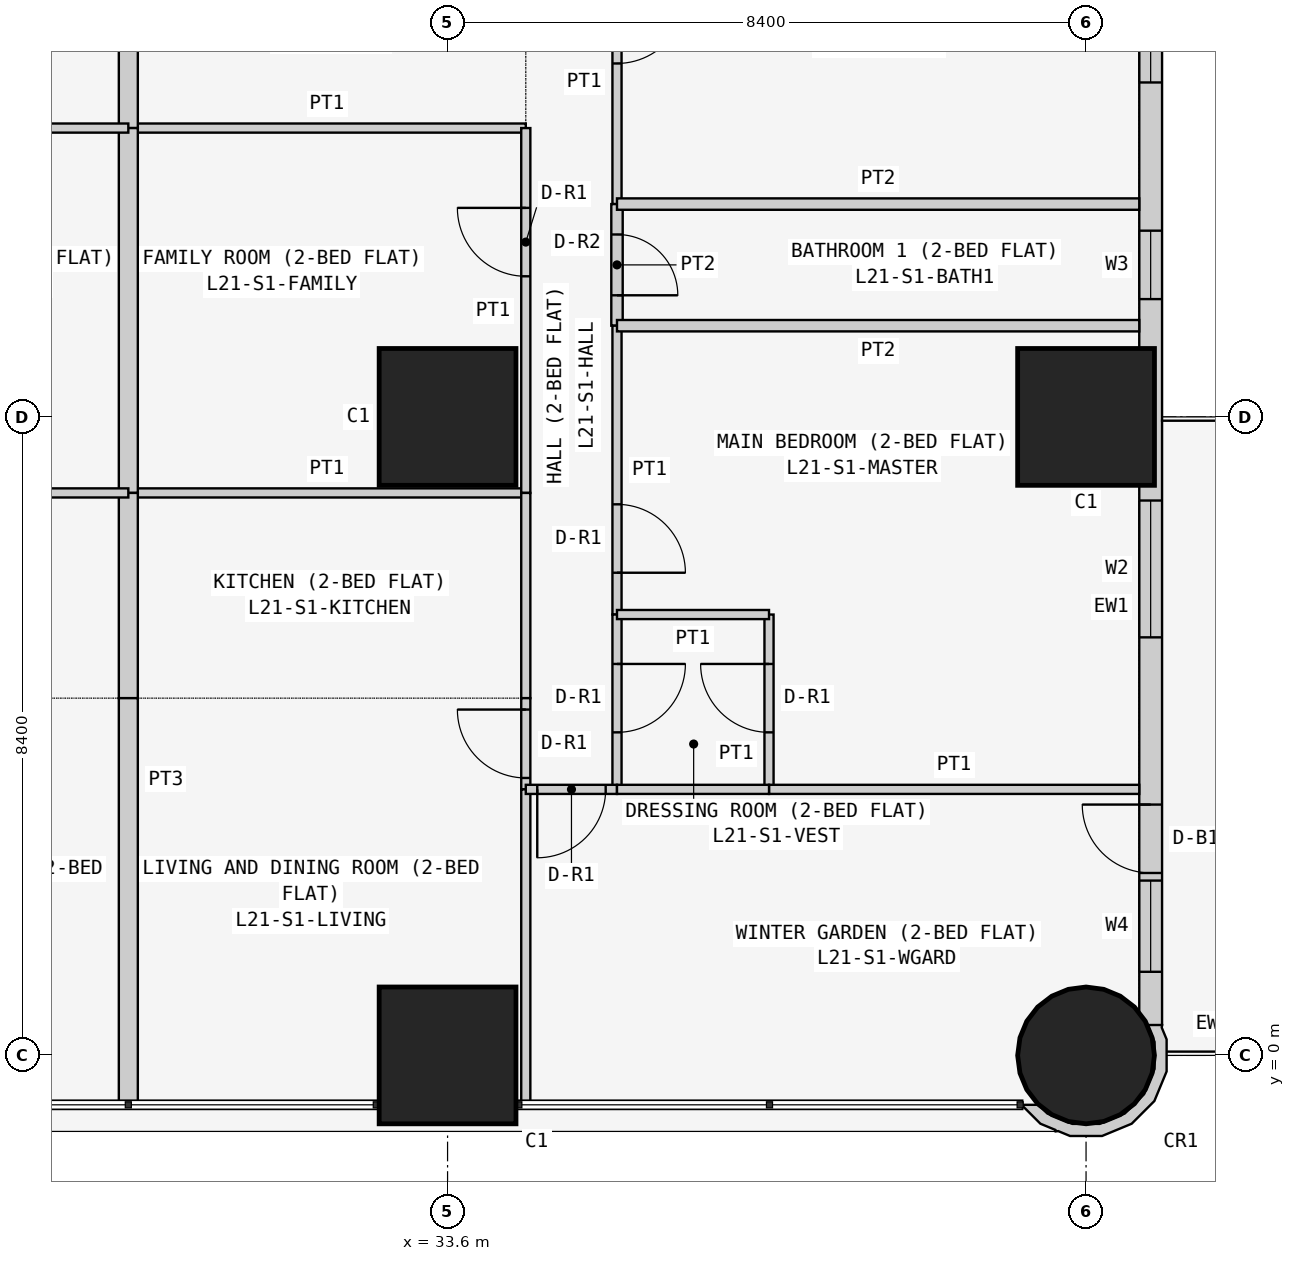
"""IFC4 building model, lengths in metres.
Left out: names, types, materials, properties, quantities, classifications, styles, units other than length and angle.
Written with IfcOpenShell. Run it as: python <this file> out.ifc"""

import sys

from ifc_helpers import new_model, si_unit, direction, frame, frame_2d, origin, origin_2d, place, context, subcontext, project, spatial, polyline, rectangle, circle, outline, extrude, element, fill, save


model = new_model("IFC4")
c1 = context("Model", 3, precision=1e-05, world=origin(), true_north=direction((0.0, 1.0)))
c2 = subcontext(c1, "Body", "Model", "MODEL_VIEW")
j1 = project(units=[si_unit("LENGTHUNIT", "METRE"), si_unit("PLANEANGLEUNIT", "RADIAN")], contexts=[c1])
p1 = place(None, origin())
s1 = spatial("IfcSite", under=j1, at=p1, CompositionType="ELEMENT")
p2 = place(p1, origin())
s2 = spatial("IfcBuilding", under=s1, at=p2, CompositionType="ELEMENT")
p3 = place(p2, frame((0.0, 0.0, 84.9)))
s3 = spatial("IfcBuildingStorey", under=s2, at=p3, CompositionType="ELEMENT", Elevation=84.9)
for number, where, z_axis, x_axis in (
    (1, (33.6, 0.0, 0.0), (0.0, 0.0, 1.0), (1.0, 0.0, 0.0)),
    (2, (33.6, 8.4, 0.0), (0.0, 0.0, 1.0), (1.0, 0.0, 0.0)),
):
    element("IfcColumn", number, at=place(p3, frame(where, z_axis=z_axis, x_axis=x_axis)), inside=s3, PredefinedType="COLUMN", context=c2, shape_type="SweptSolid", body=[
        extrude(rectangle(XDim=1.8, YDim=1.8, at=origin_2d()), origin(), (0.0, 0.0, 1.0), 3.6),
    ])
p4 = place(p3, frame((42.0, 0.0, 0.0), z_axis=(0.0, 0.0, 1.0), x_axis=(1.0, 0.0, 0.0)))
e3 = element("IfcColumn", 3, at=p4, inside=s3, PredefinedType="COLUMN", context=c2, shape_type="SweptSolid", body=[
    extrude(circle(Radius=0.9, at=origin_2d()), origin(), (0.0, 0.0, 1.0), 3.6),
])
p5 = place(p3, frame((42.0, 8.4, 0.0), z_axis=(0.0, 0.0, 1.0), x_axis=(1.0, 0.0, 0.0)))
e4 = element("IfcColumn", 4, at=p5, inside=s3, PredefinedType="COLUMN", context=c2, shape_type="SweptSolid", body=[
    extrude(rectangle(XDim=1.8, YDim=1.8, at=origin_2d()), origin(), (0.0, 0.0, 1.0), 3.6),
])
p6 = place(p3, frame((42.85, 0.4, 0.0), z_axis=(0.0, 0.0, 1.0), x_axis=(0.0, 1.0, 0.0)))
e5 = element("IfcWall", 5, at=p6, inside=s3, PredefinedType="SOLIDWALL", context=c2, shape_type="SweptSolid", body=[
    extrude(rectangle(XDim=15.7, YDim=0.3, at=frame_2d((7.85, 0.0))), origin(), (0.0, 0.0, 1.0), 3.45),
])
p7 = place(p6, frame((12.4, 0.0, 0.9)))
e6 = element("IfcOpeningElement", 6, at=p7, cuts=e5, PredefinedType="OPENING", context=c2, shape_type="SweptSolid", body=[
    extrude(rectangle(XDim=1.8, YDim=1.5, at=frame_2d((0.9, 0.75))), frame((0.0, 0.16, 0.0), z_axis=(0.0, -1.0, 0.0), x_axis=(1.0, 0.0, 0.0)), (0.0, 0.0, 1.0), 0.32),
])
p8 = place(p6, frame((9.55, 0.0, 1.5)))
e7 = element("IfcOpeningElement", 7, at=p8, cuts=e5, PredefinedType="OPENING", context=c2, shape_type="SweptSolid", body=[
    extrude(rectangle(XDim=0.9, YDim=0.7, at=frame_2d((0.45, 0.35))), frame((0.0, 0.16, 0.0), z_axis=(0.0, -1.0, 0.0), x_axis=(1.0, 0.0, 0.0)), (0.0, 0.0, 1.0), 0.32),
])
p9 = place(p6, frame((5.1, 0.0, 0.9)))
e8 = element("IfcOpeningElement", 8, at=p9, cuts=e5, PredefinedType="OPENING", context=c2, shape_type="SweptSolid", body=[
    extrude(rectangle(XDim=1.8, YDim=1.5, at=frame_2d((0.9, 0.75))), frame((0.0, 0.16, 0.0), z_axis=(0.0, -1.0, 0.0), x_axis=(1.0, 0.0, 0.0)), (0.0, 0.0, 1.0), 0.32),
])
p10 = place(p6, frame((2.0, 0.0, 0.0)))
e9 = element("IfcOpeningElement", 9, at=p10, cuts=e5, PredefinedType="OPENING", context=c2, shape_type="SweptSolid", body=[
    extrude(rectangle(XDim=0.9, YDim=2.4, at=frame_2d((0.45, 1.2))), frame((0.0, 0.16, 0.0), z_axis=(0.0, -1.0, 0.0), x_axis=(1.0, 0.0, 0.0)), (0.0, 0.0, 1.0), 0.32),
])
p11 = place(p6, frame((0.7, 0.0, 0.9)))
e10 = element("IfcOpeningElement", 10, at=p11, cuts=e5, PredefinedType="OPENING", context=c2, shape_type="SweptSolid", body=[
    extrude(rectangle(XDim=1.2, YDim=1.5, at=frame_2d((0.6, 0.75))), frame((0.0, 0.16, 0.0), z_axis=(0.0, -1.0, 0.0), x_axis=(1.0, 0.0, 0.0)), (0.0, 0.0, 1.0), 0.32),
])
p12 = place(p3, frame((41.233, -0.611, 0.0), z_axis=(0.0, 0.0, 1.0), x_axis=(0.377204953059, -0.926129809145, 0.0)))
e11 = element("IfcWall", 11, at=p12, inside=s3, PredefinedType="SOLIDWALL", context=c2, shape_type="SweptSolid", body=[
    extrude(outline(polyline([(0.319, 1.843), (-0.072, 2.001), (-0.24, 2.001), (-0.269, 2.017), (-0.37, 1.841), (-0.102, 1.842), (0.23, 1.707), (0.485, 1.455), (0.624, 1.125), (0.626, 0.766), (0.49, 0.434), (0.239, 0.179), (0.09, 0.117), (0.011, -0.078), (0.024, -0.083), (0.33, 0.045), (0.48, 0.197), (0.499, 0.193), (0.508, 0.225), (0.626, 0.345), (0.785, 0.736), (0.782, 1.157), (0.619, 1.546), (0.319, 1.843)])), origin(), (0.0, 0.0, 1.0), 3.45),
])
p13 = place(p3, frame((29.4, 12.2, 0.0), z_axis=(0.0, 0.0, 1.0), x_axis=(1.0, 0.0, 0.0)))
e12 = element("IfcWall", 12, at=p13, inside=s3, PredefinedType="PARTITIONING", context=c2, shape_type="SweptSolid", body=[
    extrude(rectangle(XDim=5.229, YDim=0.12, at=frame_2d((2.615, 0.0))), origin(), (0.0, 0.0, 1.0), 3.45),
])
p14 = place(p3, frame((29.4, 15.775, 0.0), z_axis=(0.0, 0.0, 1.0), x_axis=(0.0, -1.0, 0.0)))
e13 = element("IfcWall", 13, at=p14, inside=s3, PredefinedType="PARTITIONING", context=c2, shape_type="SweptSolid", body=[
    extrude(rectangle(XDim=3.575, YDim=0.25, at=frame_2d((1.788, 0.0))), origin(), (0.0, 0.0, 1.0), 2.848),
])
p15 = place(p3, frame((29.4, 7.4, 0.0), z_axis=(0.0, 0.0, 1.0), x_axis=(1.0, 0.0, 0.0)))
e14 = element("IfcWall", 14, at=p15, inside=s3, PredefinedType="PARTITIONING", context=c2, shape_type="SweptSolid", body=[
    extrude(rectangle(XDim=5.229, YDim=0.12, at=frame_2d((2.615, 0.0))), origin(), (0.0, 0.0, 1.0), 3.45),
])
p16 = place(p3, frame((34.629, 7.4, 0.0), z_axis=(0.0, 0.0, 1.0), x_axis=(0.0, 1.0, 0.0)))
e15 = element("IfcWall", 15, at=p16, inside=s3, PredefinedType="PARTITIONING", context=c2, shape_type="SweptSolid", body=[
    extrude(rectangle(XDim=4.8, YDim=0.12, at=frame_2d((2.4, 0.0))), origin(), (0.0, 0.0, 1.0), 3.45),
])
p17 = place(p16, frame((2.85, 0.0, 0.0)))
e16 = element("IfcOpeningElement", 16, at=p17, cuts=e15, PredefinedType="OPENING", context=c2, shape_type="SweptSolid", body=[
    extrude(rectangle(XDim=0.9, YDim=2.1, at=frame_2d((0.45, 1.05))), frame((0.0, 0.07, 0.0), z_axis=(0.0, -1.0, 0.0), x_axis=(1.0, 0.0, 0.0)), (0.0, 0.0, 1.0), 0.14),
])
p18 = place(p3, frame((29.4, 12.2, 0.0), z_axis=(0.0, 0.0, 1.0), x_axis=(0.0, -1.0, 0.0)))
e17 = element("IfcWall", 17, at=p18, inside=s3, PredefinedType="PARTITIONING", context=c2, shape_type="SweptSolid", body=[
    extrude(rectangle(XDim=4.8, YDim=0.25, at=frame_2d((2.4, 0.0))), origin(), (0.0, 0.0, 1.0), 2.848),
])
p19 = place(p3, frame((34.629, 4.7, 0.0), z_axis=(0.0, 0.0, 1.0), x_axis=(0.0, 1.0, 0.0)))
e18 = element("IfcWall", 18, at=p19, inside=s3, PredefinedType="PARTITIONING", context=c2, shape_type="SweptSolid", body=[
    extrude(rectangle(XDim=2.7, YDim=0.12, at=frame_2d((1.35, 0.0))), origin(), (0.0, 0.0, 1.0), 3.45),
])
p20 = place(p3, frame((29.4, 7.4, 0.0), z_axis=(0.0, 0.0, 1.0), x_axis=(0.0, -1.0, 0.0)))
e19 = element("IfcWall", 19, at=p20, inside=s3, PredefinedType="PARTITIONING", context=c2, shape_type="SweptSolid", body=[
    extrude(rectangle(XDim=2.7, YDim=0.25, at=frame_2d((1.35, 0.0))), origin(), (0.0, 0.0, 1.0), 2.848),
])
p21 = place(p3, frame((34.629, 3.5, 0.0), z_axis=(0.0, 0.0, 1.0), x_axis=(0.0, 1.0, 0.0)))
e20 = element("IfcWall", 20, at=p21, inside=s3, PredefinedType="PARTITIONING", context=c2, shape_type="SweptSolid", body=[
    extrude(rectangle(XDim=1.2, YDim=0.12, at=frame_2d((0.6, 0.0))), origin(), (0.0, 0.0, 1.0), 3.45),
])
p22 = place(p21, frame((0.15, 0.0, 0.0)))
e21 = element("IfcOpeningElement", 21, at=p22, cuts=e20, PredefinedType="OPENING", context=c2, shape_type="SweptSolid", body=[
    extrude(rectangle(XDim=0.9, YDim=2.1, at=frame_2d((0.45, 1.05))), frame((0.0, 0.07, 0.0), z_axis=(0.0, -1.0, 0.0), x_axis=(1.0, 0.0, 0.0)), (0.0, 0.0, 1.0), 0.14),
])
p23 = place(p3, frame((34.629, -0.65, 0.0), z_axis=(0.0, 0.0, 1.0), x_axis=(0.0, 1.0, 0.0)))
e22 = element("IfcWall", 22, at=p23, inside=s3, PredefinedType="PARTITIONING", context=c2, shape_type="SweptSolid", body=[
    extrude(rectangle(XDim=4.15, YDim=0.12, at=frame_2d((2.075, 0.0))), origin(), (0.0, 0.0, 1.0), 3.45),
])
p24 = place(p3, frame((29.4, 4.7, 0.0), z_axis=(0.0, 0.0, 1.0), x_axis=(0.0, -1.0, 0.0)))
e23 = element("IfcWall", 23, at=p24, inside=s3, PredefinedType="PARTITIONING", context=c2, shape_type="SweptSolid", body=[
    extrude(rectangle(XDim=5.35, YDim=0.25, at=frame_2d((2.675, 0.0))), origin(), (0.0, 0.0, 1.0), 2.848),
])
p25 = place(p3, frame((35.829, 11.2, 0.0), z_axis=(0.0, 0.0, 1.0), x_axis=(0.0, 1.0, 0.0)))
e24 = element("IfcWall", 24, at=p25, inside=s3, PredefinedType="PARTITIONING", context=c2, shape_type="SweptSolid", body=[
    extrude(rectangle(XDim=4.575, YDim=0.12, at=frame_2d((2.288, 0.0))), origin(), (0.0, 0.0, 1.0), 3.45),
])
p26 = place(p25, frame((1.85, 0.0, 0.0)))
e25 = element("IfcOpeningElement", 25, at=p26, cuts=e24, PredefinedType="OPENING", context=c2, shape_type="SweptSolid", body=[
    extrude(rectangle(XDim=0.9, YDim=2.1, at=frame_2d((0.45, 1.05))), frame((0.0, 0.07, 0.0), z_axis=(0.0, -1.0, 0.0), x_axis=(1.0, 0.0, 0.0)), (0.0, 0.0, 1.0), 0.14),
])
p27 = place(p3, frame((35.829, 9.6, 0.0), z_axis=(0.0, 0.0, 1.0), x_axis=(0.0, 1.0, 0.0)))
e26 = element("IfcWall", 26, at=p27, inside=s3, PredefinedType="PARTITIONING", context=c2, shape_type="SweptSolid", body=[
    extrude(rectangle(XDim=1.6, YDim=0.15, at=frame_2d((0.8, 0.0))), origin(), (0.0, 0.0, 1.0), 3.45),
])
p28 = place(p27, frame((0.4, 0.0, 0.0)))
e27 = element("IfcOpeningElement", 27, at=p28, cuts=e26, PredefinedType="OPENING", context=c2, shape_type="SweptSolid", body=[
    extrude(rectangle(XDim=0.8, YDim=2.1, at=frame_2d((0.4, 1.05))), frame((0.0, 0.085, 0.0), z_axis=(0.0, -1.0, 0.0), x_axis=(1.0, 0.0, 0.0)), (0.0, 0.0, 1.0), 0.17),
])
p29 = place(p3, frame((35.829, 5.8, 0.0), z_axis=(0.0, 0.0, 1.0), x_axis=(0.0, 1.0, 0.0)))
e28 = element("IfcWall", 28, at=p29, inside=s3, PredefinedType="PARTITIONING", context=c2, shape_type="SweptSolid", body=[
    extrude(rectangle(XDim=3.8, YDim=0.12, at=frame_2d((1.9, 0.0))), origin(), (0.0, 0.0, 1.0), 3.45),
])
p30 = place(p29, frame((0.55, 0.0, 0.0)))
e29 = element("IfcOpeningElement", 29, at=p30, cuts=e28, PredefinedType="OPENING", context=c2, shape_type="SweptSolid", body=[
    extrude(rectangle(XDim=0.9, YDim=2.1, at=frame_2d((0.45, 1.05))), frame((0.0, 0.07, 0.0), z_axis=(0.0, -1.0, 0.0), x_axis=(1.0, 0.0, 0.0)), (0.0, 0.0, 1.0), 0.14),
])
p31 = place(p3, frame((35.829, 3.5, 0.0), z_axis=(0.0, 0.0, 1.0), x_axis=(0.0, 1.0, 0.0)))
e30 = element("IfcWall", 30, at=p31, inside=s3, PredefinedType="PARTITIONING", context=c2, shape_type="SweptSolid", body=[
    extrude(rectangle(XDim=2.3, YDim=0.12, at=frame_2d((1.15, 0.0))), origin(), (0.0, 0.0, 1.0), 3.45),
])
p32 = place(p31, frame((0.75, 0.0, 0.0)))
e31 = element("IfcOpeningElement", 31, at=p32, cuts=e30, PredefinedType="OPENING", context=c2, shape_type="SweptSolid", body=[
    extrude(rectangle(XDim=0.9, YDim=2.1, at=frame_2d((0.45, 1.05))), frame((0.0, 0.07, 0.0), z_axis=(0.0, -1.0, 0.0), x_axis=(1.0, 0.0, 0.0)), (0.0, 0.0, 1.0), 0.14),
])
p33 = place(p3, frame((34.629, 3.5, 0.0), z_axis=(0.0, 0.0, 1.0), x_axis=(1.0, 0.0, 0.0)))
e32 = element("IfcWall", 32, at=p33, inside=s3, PredefinedType="PARTITIONING", context=c2, shape_type="SweptSolid", body=[
    extrude(rectangle(XDim=1.2, YDim=0.12, at=frame_2d((0.6, 0.0))), origin(), (0.0, 0.0, 1.0), 3.45),
])
p34 = place(p33, frame((0.151, 0.0, 0.0)))
e33 = element("IfcOpeningElement", 33, at=p34, cuts=e32, PredefinedType="OPENING", context=c2, shape_type="SweptSolid", body=[
    extrude(rectangle(XDim=0.9, YDim=2.1, at=frame_2d((0.45, 1.05))), frame((0.0, 0.07, 0.0), z_axis=(0.0, -1.0, 0.0), x_axis=(1.0, 0.0, 0.0)), (0.0, 0.0, 1.0), 0.14),
])
for number, where, z_axis, x_axis in (
    (34, (35.829, 11.2, 0.0), (0.0, 0.0, 1.0), (1.0, 0.0, 0.0)),
    (35, (35.829, 9.6, 0.0), (0.0, 0.0, 1.0), (1.0, 0.0, 0.0)),
):
    element("IfcWall", number, at=place(p3, frame(where, z_axis=z_axis, x_axis=x_axis)), inside=s3, PredefinedType="PARTITIONING", context=c2, shape_type="SweptSolid", body=[
        extrude(rectangle(XDim=6.871, YDim=0.15, at=frame_2d((3.436, 0.0))), origin(), (0.0, 0.0, 1.0), 3.45),
    ])
p35 = place(p3, frame((37.829, 3.5, 0.0), z_axis=(0.0, 0.0, 1.0), x_axis=(0.0, 1.0, 0.0)))
e36 = element("IfcWall", 36, at=p35, inside=s3, PredefinedType="PARTITIONING", context=c2, shape_type="SweptSolid", body=[
    extrude(rectangle(XDim=2.3, YDim=0.12, at=frame_2d((1.15, 0.0))), origin(), (0.0, 0.0, 1.0), 2.848),
])
p36 = place(p35, frame((0.75, 0.0, 0.0)))
e37 = element("IfcOpeningElement", 37, at=p36, cuts=e36, PredefinedType="OPENING", context=c2, shape_type="SweptSolid", body=[
    extrude(rectangle(XDim=0.9, YDim=2.1, at=frame_2d((0.45, 1.05))), frame((0.0, 0.07, 0.0), z_axis=(0.0, -1.0, 0.0), x_axis=(1.0, 0.0, 0.0)), (0.0, 0.0, 1.0), 0.14),
])
p37 = place(p3, frame((37.829, 5.8, 0.0), z_axis=(0.0, 0.0, 1.0), x_axis=(-1.0, 0.0, 0.0)))
e38 = element("IfcWall", 38, at=p37, inside=s3, PredefinedType="PARTITIONING", context=c2, shape_type="SweptSolid", body=[
    extrude(rectangle(XDim=2.0, YDim=0.12, at=frame_2d((1.0, 0.0))), origin(), (0.0, 0.0, 1.0), 3.45),
])
p38 = place(p3, frame((42.7, 3.5, 0.0), z_axis=(0.0, 0.0, 1.0), x_axis=(-1.0, 0.0, 0.0)))
e39 = element("IfcWall", 39, at=p38, inside=s3, PredefinedType="PARTITIONING", context=c2, shape_type="SweptSolid", body=[
    extrude(rectangle(XDim=4.871, YDim=0.12, at=frame_2d((2.436, 0.0))), origin(), (0.0, 0.0, 1.0), 3.45),
])
p39 = place(p3, frame((35.829, 3.5, 0.0), z_axis=(0.0, 0.0, 1.0), x_axis=(1.0, 0.0, 0.0)))
e40 = element("IfcWall", 40, at=p39, inside=s3, PredefinedType="PARTITIONING", context=c2, shape_type="SweptSolid", body=[
    extrude(rectangle(XDim=2.0, YDim=0.12, at=frame_2d((1.0, 0.0))), origin(), (0.0, 0.0, 1.0), 3.45),
])
for number, where, z_axis, x_axis in (
    (41, (29.4, 12.2, 0.0), (0.0, 0.0, 1.0), (-1.0, 0.0, 0.0)),
    (42, (29.4, 7.4, 0.0), (0.0, 0.0, 1.0), (-1.0, 0.0, 0.0)),
):
    element("IfcWall", number, at=place(p3, frame(where, z_axis=z_axis, x_axis=x_axis)), inside=s3, PredefinedType="PARTITIONING", context=c2, shape_type="SweptSolid", body=[
        extrude(rectangle(XDim=5.229, YDim=0.12, at=frame_2d((2.615, 0.0))), origin(), (0.0, 0.0, 1.0), 3.45),
    ])
p40 = place(p7, origin())
e43 = element("IfcWindow", 43, at=p40, inside=s3, PartitioningType="SINGLE_PANEL", PredefinedType="WINDOW", context=c2, shape_type="SweptSolid", body=[
    extrude(rectangle(XDim=1.8, YDim=1.5, at=frame_2d((0.9, 0.75))), frame((0.0, 0.03, 0.0), z_axis=(0.0, -1.0, 0.0), x_axis=(1.0, 0.0, 0.0)), (0.0, 0.0, 1.0), 0.06),
])
fill(e6, e43)
p41 = place(p8, origin())
e44 = element("IfcWindow", 44, at=p41, inside=s3, PartitioningType="SINGLE_PANEL", PredefinedType="WINDOW", context=c2, shape_type="SweptSolid", body=[
    extrude(rectangle(XDim=0.9, YDim=0.7, at=frame_2d((0.45, 0.35))), frame((0.0, 0.03, 0.0), z_axis=(0.0, -1.0, 0.0), x_axis=(1.0, 0.0, 0.0)), (0.0, 0.0, 1.0), 0.06),
])
fill(e7, e44)
p42 = place(p9, origin())
e45 = element("IfcWindow", 45, at=p42, inside=s3, PartitioningType="SINGLE_PANEL", PredefinedType="WINDOW", context=c2, shape_type="SweptSolid", body=[
    extrude(rectangle(XDim=1.8, YDim=1.5, at=frame_2d((0.9, 0.75))), frame((0.0, 0.03, 0.0), z_axis=(0.0, -1.0, 0.0), x_axis=(1.0, 0.0, 0.0)), (0.0, 0.0, 1.0), 0.06),
])
fill(e8, e45)
p43 = place(p10, origin())
e46 = element("IfcDoor", 46, at=p43, inside=s3, OperationType="SINGLE_SWING_RIGHT", PredefinedType="DOOR", context=c2, shape_type="SweptSolid", body=[
    extrude(rectangle(XDim=0.9, YDim=2.4, at=frame_2d((0.45, 1.2))), frame((0.0, 0.025, 0.0), z_axis=(0.0, -1.0, 0.0), x_axis=(1.0, 0.0, 0.0)), (0.0, 0.0, 1.0), 0.05),
])
fill(e9, e46)
p44 = place(p11, origin())
e47 = element("IfcWindow", 47, at=p44, inside=s3, PartitioningType="SINGLE_PANEL", PredefinedType="WINDOW", context=c2, shape_type="SweptSolid", body=[
    extrude(rectangle(XDim=1.2, YDim=1.5, at=frame_2d((0.6, 0.75))), frame((0.0, 0.03, 0.0), z_axis=(0.0, -1.0, 0.0), x_axis=(1.0, 0.0, 0.0)), (0.0, 0.0, 1.0), 0.06),
])
fill(e10, e47)
p45 = place(p17, origin())
e48 = element("IfcDoor", 48, at=p45, inside=s3, OperationType="SINGLE_SWING_RIGHT", PredefinedType="DOOR", context=c2, shape_type="SweptSolid", body=[
    extrude(rectangle(XDim=0.9, YDim=2.1, at=frame_2d((0.45, 1.05))), frame((0.0, 0.025, 0.0), z_axis=(0.0, -1.0, 0.0), x_axis=(1.0, 0.0, 0.0)), (0.0, 0.0, 1.0), 0.05),
])
fill(e16, e48)
p46 = place(p22, origin())
e49 = element("IfcDoor", 49, at=p46, inside=s3, OperationType="SINGLE_SWING_RIGHT", PredefinedType="DOOR", context=c2, shape_type="SweptSolid", body=[
    extrude(rectangle(XDim=0.9, YDim=2.1, at=frame_2d((0.45, 1.05))), frame((0.0, 0.025, 0.0), z_axis=(0.0, -1.0, 0.0), x_axis=(1.0, 0.0, 0.0)), (0.0, 0.0, 1.0), 0.05),
])
fill(e21, e49)
p47 = place(p26, frame((0.9, 0.0, 0.0), z_axis=(0.0, 0.0, 1.0), x_axis=(-1.0, 0.0, 0.0)))
e50 = element("IfcDoor", 50, at=p47, inside=s3, OperationType="SINGLE_SWING_LEFT", PredefinedType="DOOR", context=c2, shape_type="SweptSolid", body=[
    extrude(rectangle(XDim=0.9, YDim=2.1, at=frame_2d((0.45, 1.05))), frame((0.0, 0.025, 0.0), z_axis=(0.0, -1.0, 0.0), x_axis=(1.0, 0.0, 0.0)), (0.0, 0.0, 1.0), 0.05),
])
fill(e25, e50)
p48 = place(p28, frame((0.8, 0.0, 0.0), z_axis=(0.0, 0.0, 1.0), x_axis=(-1.0, 0.0, 0.0)))
e51 = element("IfcDoor", 51, at=p48, inside=s3, OperationType="SINGLE_SWING_RIGHT", PredefinedType="DOOR", context=c2, shape_type="SweptSolid", body=[
    extrude(rectangle(XDim=0.8, YDim=2.1, at=frame_2d((0.4, 1.05))), frame((0.0, 0.025, 0.0), z_axis=(0.0, -1.0, 0.0), x_axis=(1.0, 0.0, 0.0)), (0.0, 0.0, 1.0), 0.05),
])
fill(e27, e51)
p49 = place(p30, frame((0.9, 0.0, 0.0), z_axis=(0.0, 0.0, 1.0), x_axis=(-1.0, 0.0, 0.0)))
e52 = element("IfcDoor", 52, at=p49, inside=s3, OperationType="SINGLE_SWING_RIGHT", PredefinedType="DOOR", context=c2, shape_type="SweptSolid", body=[
    extrude(rectangle(XDim=0.9, YDim=2.1, at=frame_2d((0.45, 1.05))), frame((0.0, 0.025, 0.0), z_axis=(0.0, -1.0, 0.0), x_axis=(1.0, 0.0, 0.0)), (0.0, 0.0, 1.0), 0.05),
])
fill(e29, e52)
p50 = place(p32, frame((0.9, 0.0, 0.0), z_axis=(0.0, 0.0, 1.0), x_axis=(-1.0, 0.0, 0.0)))
e53 = element("IfcDoor", 53, at=p50, inside=s3, OperationType="SINGLE_SWING_LEFT", PredefinedType="DOOR", context=c2, shape_type="SweptSolid", body=[
    extrude(rectangle(XDim=0.9, YDim=2.1, at=frame_2d((0.45, 1.05))), frame((0.0, 0.025, 0.0), z_axis=(0.0, -1.0, 0.0), x_axis=(1.0, 0.0, 0.0)), (0.0, 0.0, 1.0), 0.05),
])
fill(e31, e53)
p51 = place(p36, origin())
e54 = element("IfcDoor", 54, at=p51, inside=s3, OperationType="SINGLE_SWING_RIGHT", PredefinedType="DOOR", context=c2, shape_type="SweptSolid", body=[
    extrude(rectangle(XDim=0.9, YDim=2.1, at=frame_2d((0.45, 1.05))), frame((0.0, 0.025, 0.0), z_axis=(0.0, -1.0, 0.0), x_axis=(1.0, 0.0, 0.0)), (0.0, 0.0, 1.0), 0.05),
])
fill(e37, e54)
p52 = place(p34, frame((0.9, 0.0, 0.0), z_axis=(0.0, 0.0, 1.0), x_axis=(-1.0, 0.0, 0.0)))
e55 = element("IfcDoor", 55, at=p52, inside=s3, OperationType="SINGLE_SWING_RIGHT", PredefinedType="DOOR", context=c2, shape_type="SweptSolid", body=[
    extrude(rectangle(XDim=0.9, YDim=2.1, at=frame_2d((0.45, 1.05))), frame((0.0, 0.025, 0.0), z_axis=(0.0, -1.0, 0.0), x_axis=(1.0, 0.0, 0.0)), (0.0, 0.0, 1.0), 0.05),
])
fill(e33, e55)
save(model, sys.argv[1])
